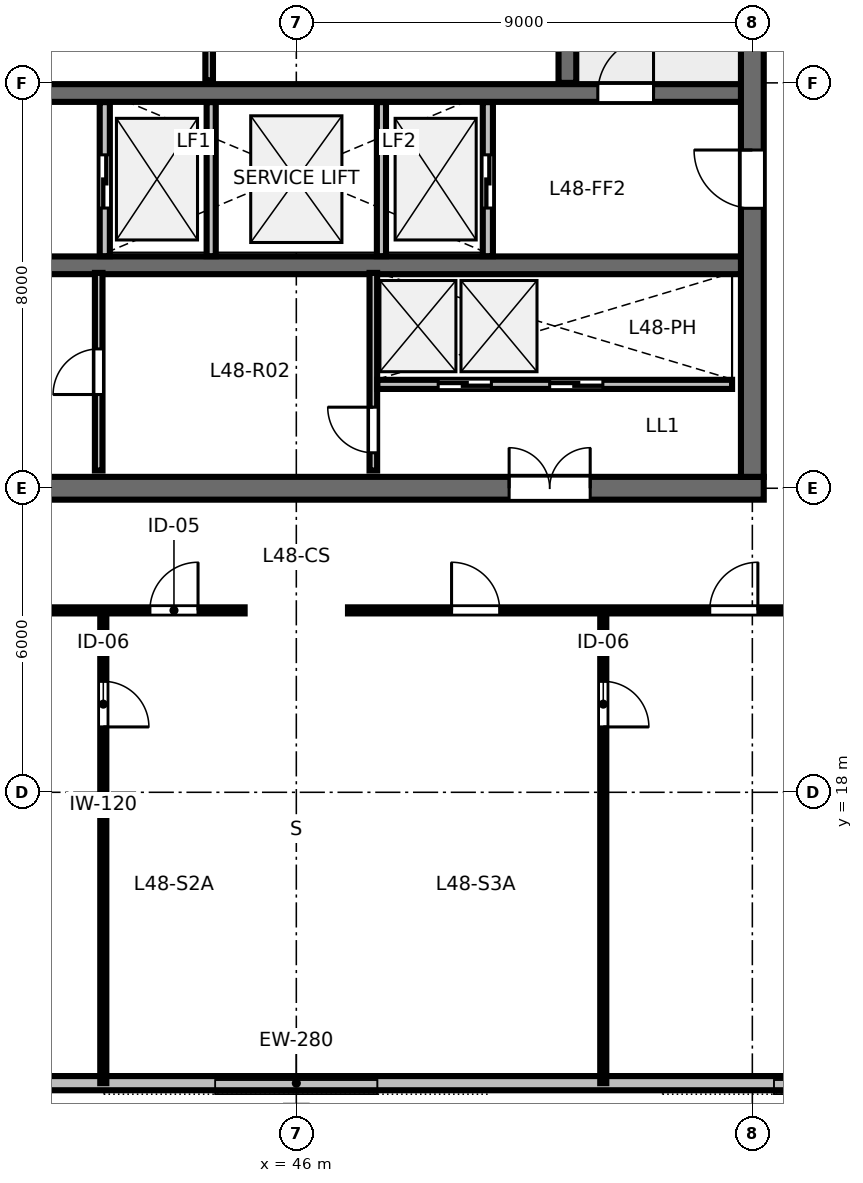
"""IFC4 building model, lengths in metres.
Left out: names, types, materials, properties, quantities, classifications, styles, units other than length and angle.
Written with IfcOpenShell. Run it as: python <this file> out.ifc"""

import sys

from ifc_helpers import new_model, si_unit, direction, frame, frame_2d, origin, origin_2d, place, context, subcontext, project, spatial, rectangle, i_section, extrude, element, fill, save


model = new_model("IFC4")
c1 = context("Model", 3, precision=1e-05, world=origin(), true_north=direction((0.0, 1.0)))
c2 = subcontext(c1, "Body", "Model", "MODEL_VIEW")
j1 = project(units=[si_unit("LENGTHUNIT", "METRE"), si_unit("PLANEANGLEUNIT", "RADIAN")], contexts=[c1])
p1 = place(None, origin())
s1 = spatial("IfcSite", under=j1, at=p1, CompositionType="ELEMENT")
p2 = place(p1, origin())
s2 = spatial("IfcBuilding", under=s1, at=p2, CompositionType="ELEMENT")
p3 = place(p2, frame((0.0, 0.0, 184.2)))
s3 = spatial("IfcBuildingStorey", under=s2, at=p3, CompositionType="ELEMENT", Elevation=184.2)
p4 = place(p3, frame((36.775, 24.0, 0.0), z_axis=(0.0, 0.0, 1.0), x_axis=(1.0, 0.0, 0.0)))
e1 = element("IfcWall", 1, at=p4, inside=s3, PredefinedType="SHEAR", context=c2, shape_type="SweptSolid", body=[
    extrude(rectangle(XDim=18.45, YDim=0.45, at=frame_2d((9.225, 0.0))), origin(), (0.0, 0.0, 1.0), 3.36),
])
p5 = place(p4, frame((13.425, 0.0, 0.0)))
e2 = element("IfcOpeningElement", 2, at=p5, cuts=e1, PredefinedType="OPENING", context=c2, shape_type="SweptSolid", body=[
    extrude(rectangle(XDim=1.6, YDim=2.15, at=frame_2d((0.8, 1.075))), frame((0.0, 0.235, 0.0), z_axis=(0.0, -1.0, 0.0), x_axis=(1.0, 0.0, 0.0)), (0.0, 0.0, 1.0), 0.47),
])
p6 = place(p3, frame((55.0, 24.225, 0.0), z_axis=(0.0, 0.0, 1.0), x_axis=(0.0, 1.0, 0.0)))
e3 = element("IfcWall", 3, at=p6, inside=s3, PredefinedType="SHEAR", context=c2, shape_type="SweptSolid", body=[
    extrude(rectangle(XDim=15.55, YDim=0.45, at=frame_2d((7.775, 0.0))), origin(), (0.0, 0.0, 1.0), 3.36),
])
p7 = place(p6, frame((5.3, 0.0, 0.0)))
e4 = element("IfcOpeningElement", 4, at=p7, cuts=e3, PredefinedType="OPENING", context=c2, shape_type="SweptSolid", body=[
    extrude(rectangle(XDim=1.15, YDim=2.15, at=frame_2d((0.575, 1.075))), frame((0.0, 0.235, 0.0), z_axis=(0.0, -1.0, 0.0), x_axis=(1.0, 0.0, 0.0)), (0.0, 0.0, 1.0), 0.47),
])
p8 = place(p3, frame((37.225, 31.8, 0.0), z_axis=(0.0, 0.0, 1.0), x_axis=(1.0, 0.0, 0.0)))
e5 = element("IfcWall", 5, at=p8, inside=s3, PredefinedType="SHEAR", context=c2, shape_type="SweptSolid", body=[
    extrude(rectangle(XDim=17.55, YDim=0.35, at=frame_2d((8.775, 0.0))), origin(), (0.0, 0.0, 1.0), 3.36),
])
p9 = place(p8, frame((0.825, 0.0, 0.0)))
e6 = element("IfcOpeningElement", 6, at=p9, cuts=e5, PredefinedType="OPENING", context=c2, shape_type="SweptSolid", body=[
    extrude(rectangle(XDim=1.1, YDim=2.15, at=frame_2d((0.55, 1.075))), frame((0.0, 0.185, 0.0), z_axis=(0.0, -1.0, 0.0), x_axis=(1.0, 0.0, 0.0)), (0.0, 0.0, 1.0), 0.37),
])
p10 = place(p8, frame((14.725, 0.0, 0.0)))
e7 = element("IfcOpeningElement", 7, at=p10, cuts=e5, PredefinedType="OPENING", context=c2, shape_type="SweptSolid", body=[
    extrude(rectangle(XDim=1.1, YDim=2.15, at=frame_2d((0.55, 1.075))), frame((0.0, 0.185, 0.0), z_axis=(0.0, -1.0, 0.0), x_axis=(1.0, 0.0, 0.0)), (0.0, 0.0, 1.0), 0.37),
])
p11 = place(p3, frame((37.225, 28.4, 0.0), z_axis=(0.0, 0.0, 1.0), x_axis=(1.0, 0.0, 0.0)))
e8 = element("IfcWall", 8, at=p11, inside=s3, PredefinedType="SHEAR", context=c2, shape_type="SweptSolid", body=[
    extrude(rectangle(XDim=17.55, YDim=0.35, at=frame_2d((8.775, 0.0))), origin(), (0.0, 0.0, 1.0), 3.36),
])
p12 = place(p3, frame((46.0, 11.6, 0.0), z_axis=(0.0, 0.192822575522, 0.981233639033), x_axis=(-1.0, 0.0, 0.0)))
e9 = element("IfcColumn", 9, at=p12, inside=s3, PredefinedType="COLUMN", context=c2, shape_type="SweptSolid", body=[
    extrude(i_section(OverallWidth=0.406, OverallDepth=0.425, WebThickness=0.033, FlangeThickness=0.052, FilletRadius=0.025, at=origin_2d()), origin(), (0.0, 0.0, 1.0), 3.422),
])
p13 = place(p3, frame((28.56, 12.26, 0.0), z_axis=(0.0, 0.0, 1.0), x_axis=(1.0, 0.0, 0.0)))
e10 = element("IfcWall", 10, at=p13, inside=s3, PredefinedType="STANDARD", context=c2, shape_type="SweptSolid", body=[
    extrude(rectangle(XDim=34.88, YDim=0.28, at=frame_2d((17.44, 0.0))), origin(), (0.0, 0.0, 1.0), 2.817),
])
p14 = place(p3, frame((51.35, 32.0, 0.0), z_axis=(0.0, 0.0, 1.0), x_axis=(0.0, 1.0, 0.0)))
e11 = element("IfcWall", 11, at=p14, inside=s3, PredefinedType="SHEAR", context=c2, shape_type="SweptSolid", body=[
    extrude(rectangle(XDim=7.7, YDim=0.35, at=frame_2d((3.85, 0.0))), origin(), (0.0, 0.0, 1.0), 3.6),
])
p15 = place(p3, frame((44.28, 32.05, 0.0), z_axis=(0.0, 0.0, 1.0), x_axis=(0.0, 1.0, 0.0)))
e12 = element("IfcWall", 12, at=p15, inside=s3, PredefinedType="PARTITIONING", context=c2, shape_type="SweptSolid", body=[
    extrude(rectangle(XDim=3.67, YDim=0.15, at=frame_2d((1.835, 0.0))), origin(), (0.0, 0.0, 1.0), 3.36),
])
p16 = place(p15, frame((1.35, 0.0, 0.0)))
e13 = element("IfcOpeningElement", 13, at=p16, cuts=e12, PredefinedType="OPENING", context=c2, shape_type="SweptSolid", body=[
    extrude(rectangle(XDim=0.92, YDim=2.15, at=frame_2d((0.46, 1.075))), frame((0.0, 0.085, 0.0), z_axis=(0.0, -1.0, 0.0), x_axis=(1.0, 0.0, 0.0)), (0.0, 0.0, 1.0), 0.17),
])
p17 = place(p3, frame((42.22, 28.58, 0.0), z_axis=(0.0, 0.0, 1.0), x_axis=(0.0, 1.0, 0.0)))
e14 = element("IfcWall", 14, at=p17, inside=s3, PredefinedType="PARTITIONING", context=c2, shape_type="SweptSolid", body=[
    extrude(rectangle(XDim=3.04, YDim=0.2, at=frame_2d((1.52, 0.0))), origin(), (0.0, 0.0, 1.0), 3.36),
])
p18 = place(p17, frame((0.95, 0.0, 0.0)))
e15 = element("IfcOpeningElement", 15, at=p18, cuts=e14, PredefinedType="OPENING", context=c2, shape_type="SweptSolid", body=[
    extrude(rectangle(XDim=1.05, YDim=2.15, at=frame_2d((0.525, 1.075))), frame((0.0, 0.11, 0.0), z_axis=(0.0, -1.0, 0.0), x_axis=(1.0, 0.0, 0.0)), (0.0, 0.0, 1.0), 0.22),
])
p19 = place(p3, frame((49.78, 28.58, 0.0), z_axis=(0.0, 0.0, 1.0), x_axis=(0.0, 1.0, 0.0)))
e16 = element("IfcWall", 16, at=p19, inside=s3, PredefinedType="PARTITIONING", context=c2, shape_type="SweptSolid", body=[
    extrude(rectangle(XDim=3.04, YDim=0.2, at=frame_2d((1.52, 0.0))), origin(), (0.0, 0.0, 1.0), 3.36),
])
p20 = place(p19, frame((0.95, 0.0, 0.0)))
e17 = element("IfcOpeningElement", 17, at=p20, cuts=e16, PredefinedType="OPENING", context=c2, shape_type="SweptSolid", body=[
    extrude(rectangle(XDim=1.05, YDim=2.15, at=frame_2d((0.525, 1.075))), frame((0.0, 0.11, 0.0), z_axis=(0.0, -1.0, 0.0), x_axis=(1.0, 0.0, 0.0)), (0.0, 0.0, 1.0), 0.22),
])
for number, where, z_axis, x_axis in (
    (18, (44.32, 28.58, 0.0), (0.0, 0.0, 1.0), (0.0, 1.0, 0.0)),
    (19, (47.68, 28.58, 0.0), (0.0, 0.0, 1.0), (0.0, 1.0, 0.0)),
):
    element("IfcWall", number, at=place(p3, frame(where, z_axis=z_axis, x_axis=x_axis)), inside=s3, PredefinedType="PARTITIONING", context=c2, shape_type="SweptSolid", body=[
        extrude(rectangle(XDim=3.04, YDim=0.18, at=frame_2d((1.52, 0.0))), origin(), (0.0, 0.0, 1.0), 3.36),
    ])
p21 = place(p3, frame((42.1, 24.35, 0.0), z_axis=(0.0, 0.0, 1.0), x_axis=(0.0, 1.0, 0.0)))
e20 = element("IfcWall", 20, at=p21, inside=s3, PredefinedType="PARTITIONING", context=c2, shape_type="SweptSolid", body=[
    extrude(rectangle(XDim=3.9, YDim=0.15, at=frame_2d((1.95, 0.0))), origin(), (0.0, 0.0, 1.0), 3.36),
])
p22 = place(p21, frame((1.5, 0.0, 0.0)))
e21 = element("IfcOpeningElement", 21, at=p22, cuts=e20, PredefinedType="OPENING", context=c2, shape_type="SweptSolid", body=[
    extrude(rectangle(XDim=0.9, YDim=2.15, at=frame_2d((0.45, 1.075))), frame((0.0, 0.085, 0.0), z_axis=(0.0, -1.0, 0.0), x_axis=(1.0, 0.0, 0.0)), (0.0, 0.0, 1.0), 0.17),
])
p23 = place(p3, frame((47.52, 24.35, 0.0), z_axis=(0.0, 0.0, 1.0), x_axis=(0.0, 1.0, 0.0)))
e22 = element("IfcWall", 22, at=p23, inside=s3, PredefinedType="PARTITIONING", context=c2, shape_type="SweptSolid", body=[
    extrude(rectangle(XDim=3.9, YDim=0.15, at=frame_2d((1.95, 0.0))), origin(), (0.0, 0.0, 1.0), 3.36),
])
p24 = place(p23, frame((0.35, 0.0, 0.0)))
e23 = element("IfcOpeningElement", 23, at=p24, cuts=e22, PredefinedType="OPENING", context=c2, shape_type="SweptSolid", body=[
    extrude(rectangle(XDim=0.9, YDim=2.15, at=frame_2d((0.45, 1.075))), frame((0.0, 0.085, 0.0), z_axis=(0.0, -1.0, 0.0), x_axis=(1.0, 0.0, 0.0)), (0.0, 0.0, 1.0), 0.17),
])
p25 = place(p3, frame((47.6, 26.05, 0.0), z_axis=(0.0, 0.0, 1.0), x_axis=(1.0, 0.0, 0.0)))
e24 = element("IfcWall", 24, at=p25, inside=s3, PredefinedType="PARTITIONING", context=c2, shape_type="SweptSolid", body=[
    extrude(rectangle(XDim=7.0, YDim=0.18, at=frame_2d((3.5, 0.0))), origin(), (0.0, 0.0, 1.0), 3.36),
])
p26 = place(p25, frame((1.2, 0.0, 0.0)))
e25 = element("IfcOpeningElement", 25, at=p26, cuts=e24, PredefinedType="OPENING", context=c2, shape_type="SweptSolid", body=[
    extrude(rectangle(XDim=1.05, YDim=2.15, at=frame_2d((0.525, 1.075))), frame((0.0, 0.1, 0.0), z_axis=(0.0, -1.0, 0.0), x_axis=(1.0, 0.0, 0.0)), (0.0, 0.0, 1.0), 0.2),
])
p27 = place(p25, frame((3.4, 0.0, 0.0)))
e26 = element("IfcOpeningElement", 26, at=p27, cuts=e24, PredefinedType="OPENING", context=c2, shape_type="SweptSolid", body=[
    extrude(rectangle(XDim=1.05, YDim=2.15, at=frame_2d((0.525, 1.075))), frame((0.0, 0.1, 0.0), z_axis=(0.0, -1.0, 0.0), x_axis=(1.0, 0.0, 0.0)), (0.0, 0.0, 1.0), 0.2),
])
p28 = place(p3, frame((42.191, 21.59, 0.0), z_axis=(0.0, 0.0, 1.0), x_axis=(0.0, -1.0, 0.0)))
e27 = element("IfcWall", 27, at=p28, inside=s3, PredefinedType="PARTITIONING", context=c2, shape_type="SweptSolid", body=[
    extrude(rectangle(XDim=9.33, YDim=0.12, at=frame_2d((4.665, 0.0))), origin(), (0.0, 0.0, 1.0), 2.64),
])
p29 = place(p28, frame((1.4, 0.0, 0.0)))
e28 = element("IfcOpeningElement", 28, at=p29, cuts=e27, PredefinedType="OPENING", context=c2, shape_type="SweptSolid", body=[
    extrude(rectangle(XDim=0.9, YDim=2.15, at=frame_2d((0.45, 1.075))), frame((0.0, 0.07, 0.0), z_axis=(0.0, -1.0, 0.0), x_axis=(1.0, 0.0, 0.0)), (0.0, 0.0, 1.0), 0.14),
])
p30 = place(p3, frame((52.058, 21.59, 0.0), z_axis=(0.0, 0.0, 1.0), x_axis=(0.0, -1.0, 0.0)))
e29 = element("IfcWall", 29, at=p30, inside=s3, PredefinedType="PARTITIONING", context=c2, shape_type="SweptSolid", body=[
    extrude(rectangle(XDim=9.33, YDim=0.12, at=frame_2d((4.665, 0.0))), origin(), (0.0, 0.0, 1.0), 2.64),
])
p31 = place(p30, frame((1.4, 0.0, 0.0)))
e30 = element("IfcOpeningElement", 30, at=p31, cuts=e29, PredefinedType="OPENING", context=c2, shape_type="SweptSolid", body=[
    extrude(rectangle(XDim=0.9, YDim=2.15, at=frame_2d((0.45, 1.075))), frame((0.0, 0.07, 0.0), z_axis=(0.0, -1.0, 0.0), x_axis=(1.0, 0.0, 0.0)), (0.0, 0.0, 1.0), 0.14),
])
p32 = place(p3, frame((34.65, 21.59, 0.0), z_axis=(0.0, 0.0, 1.0), x_axis=(1.0, 0.0, 0.0)))
e31 = element("IfcWall", 31, at=p32, inside=s3, PredefinedType="PARTITIONING", context=c2, shape_type="SweptSolid", body=[
    extrude(rectangle(XDim=10.33, YDim=0.12, at=frame_2d((5.165, 0.0))), origin(), (0.0, 0.0, 1.0), 2.64),
])
p33 = place(p32, frame((3.365, 0.0, 0.0)))
e32 = element("IfcOpeningElement", 32, at=p33, cuts=e31, PredefinedType="OPENING", context=c2, shape_type="SweptSolid", body=[
    extrude(rectangle(XDim=0.95, YDim=2.15, at=frame_2d((0.475, 1.075))), frame((0.0, 0.07, 0.0), z_axis=(0.0, -1.0, 0.0), x_axis=(1.0, 0.0, 0.0)), (0.0, 0.0, 1.0), 0.14),
])
p34 = place(p32, frame((8.46, 0.0, 0.0)))
e33 = element("IfcOpeningElement", 33, at=p34, cuts=e31, PredefinedType="OPENING", context=c2, shape_type="SweptSolid", body=[
    extrude(rectangle(XDim=0.95, YDim=2.15, at=frame_2d((0.475, 1.075))), frame((0.0, 0.07, 0.0), z_axis=(0.0, -1.0, 0.0), x_axis=(1.0, 0.0, 0.0)), (0.0, 0.0, 1.0), 0.14),
])
p35 = place(p3, frame((47.02, 21.59, 0.0), z_axis=(0.0, 0.0, 1.0), x_axis=(1.0, 0.0, 0.0)))
e34 = element("IfcWall", 34, at=p35, inside=s3, PredefinedType="PARTITIONING", context=c2, shape_type="SweptSolid", body=[
    extrude(rectangle(XDim=10.33, YDim=0.12, at=frame_2d((5.165, 0.0))), origin(), (0.0, 0.0, 1.0), 2.64),
])
p36 = place(p35, frame((2.044, 0.0, 0.0)))
e35 = element("IfcOpeningElement", 35, at=p36, cuts=e34, PredefinedType="OPENING", context=c2, shape_type="SweptSolid", body=[
    extrude(rectangle(XDim=0.95, YDim=2.15, at=frame_2d((0.475, 1.075))), frame((0.0, 0.07, 0.0), z_axis=(0.0, -1.0, 0.0), x_axis=(1.0, 0.0, 0.0)), (0.0, 0.0, 1.0), 0.14),
])
p37 = place(p35, frame((7.139, 0.0, 0.0)))
e36 = element("IfcOpeningElement", 36, at=p37, cuts=e34, PredefinedType="OPENING", context=c2, shape_type="SweptSolid", body=[
    extrude(rectangle(XDim=0.95, YDim=2.15, at=frame_2d((0.475, 1.075))), frame((0.0, 0.07, 0.0), z_axis=(0.0, -1.0, 0.0), x_axis=(1.0, 0.0, 0.0)), (0.0, 0.0, 1.0), 0.14),
])
p38 = place(p10, origin())
e37 = element("IfcDoor", 37, at=p38, inside=s3, OperationType="SINGLE_SWING_RIGHT", PredefinedType="DOOR", context=c2, shape_type="SweptSolid", body=[
    extrude(rectangle(XDim=1.1, YDim=2.15, at=frame_2d((0.55, 1.075))), frame((0.0, 0.025, 0.0), z_axis=(0.0, -1.0, 0.0), x_axis=(1.0, 0.0, 0.0)), (0.0, 0.0, 1.0), 0.05),
])
fill(e7, e37)
p39 = place(p7, origin())
e38 = element("IfcDoor", 38, at=p39, inside=s3, OperationType="SINGLE_SWING_RIGHT", PredefinedType="DOOR", context=c2, shape_type="SweptSolid", body=[
    extrude(rectangle(XDim=1.15, YDim=2.15, at=frame_2d((0.575, 1.075))), frame((0.0, 0.025, 0.0), z_axis=(0.0, -1.0, 0.0), x_axis=(1.0, 0.0, 0.0)), (0.0, 0.0, 1.0), 0.05),
])
fill(e4, e38)
p40 = place(p5, origin())
e39 = element("IfcDoor", 39, at=p40, inside=s3, OperationType="DOUBLE_DOOR_SINGLE_SWING", PredefinedType="DOOR", context=c2, shape_type="SweptSolid", body=[
    extrude(rectangle(XDim=1.6, YDim=2.15, at=frame_2d((0.8, 1.075))), frame((0.0, 0.025, 0.0), z_axis=(0.0, -1.0, 0.0), x_axis=(1.0, 0.0, 0.0)), (0.0, 0.0, 1.0), 0.05),
])
fill(e2, e39)
p41 = place(p18, origin())
e40 = element("IfcDoor", 40, at=p41, inside=s3, OperationType="SLIDING_TO_LEFT", PredefinedType="DOOR", context=c2, shape_type="SweptSolid", body=[
    extrude(rectangle(XDim=1.05, YDim=2.15, at=frame_2d((0.525, 1.075))), frame((0.0, 0.025, 0.0), z_axis=(0.0, -1.0, 0.0), x_axis=(1.0, 0.0, 0.0)), (0.0, 0.0, 1.0), 0.05),
])
fill(e15, e40)
p42 = place(p20, origin())
e41 = element("IfcDoor", 41, at=p42, inside=s3, OperationType="SLIDING_TO_RIGHT", PredefinedType="DOOR", context=c2, shape_type="SweptSolid", body=[
    extrude(rectangle(XDim=1.05, YDim=2.15, at=frame_2d((0.525, 1.075))), frame((0.0, 0.025, 0.0), z_axis=(0.0, -1.0, 0.0), x_axis=(1.0, 0.0, 0.0)), (0.0, 0.0, 1.0), 0.05),
])
fill(e17, e41)
p43 = place(p22, origin())
e42 = element("IfcDoor", 42, at=p43, inside=s3, OperationType="SINGLE_SWING_LEFT", PredefinedType="DOOR", context=c2, shape_type="SweptSolid", body=[
    extrude(rectangle(XDim=0.9, YDim=2.15, at=frame_2d((0.45, 1.075))), frame((0.0, 0.025, 0.0), z_axis=(0.0, -1.0, 0.0), x_axis=(1.0, 0.0, 0.0)), (0.0, 0.0, 1.0), 0.05),
])
fill(e21, e42)
p44 = place(p24, origin())
e43 = element("IfcDoor", 43, at=p44, inside=s3, OperationType="SINGLE_SWING_RIGHT", PredefinedType="DOOR", context=c2, shape_type="SweptSolid", body=[
    extrude(rectangle(XDim=0.9, YDim=2.15, at=frame_2d((0.45, 1.075))), frame((0.0, 0.025, 0.0), z_axis=(0.0, -1.0, 0.0), x_axis=(1.0, 0.0, 0.0)), (0.0, 0.0, 1.0), 0.05),
])
fill(e23, e43)
p45 = place(p26, origin())
e44 = element("IfcDoor", 44, at=p45, inside=s3, OperationType="SLIDING_TO_LEFT", PredefinedType="DOOR", context=c2, shape_type="SweptSolid", body=[
    extrude(rectangle(XDim=1.05, YDim=2.15, at=frame_2d((0.525, 1.075))), frame((0.0, 0.025, 0.0), z_axis=(0.0, -1.0, 0.0), x_axis=(1.0, 0.0, 0.0)), (0.0, 0.0, 1.0), 0.05),
])
fill(e25, e44)
p46 = place(p27, origin())
e45 = element("IfcDoor", 45, at=p46, inside=s3, OperationType="SLIDING_TO_RIGHT", PredefinedType="DOOR", context=c2, shape_type="SweptSolid", body=[
    extrude(rectangle(XDim=1.05, YDim=2.15, at=frame_2d((0.525, 1.075))), frame((0.0, 0.025, 0.0), z_axis=(0.0, -1.0, 0.0), x_axis=(1.0, 0.0, 0.0)), (0.0, 0.0, 1.0), 0.05),
])
fill(e26, e45)
p47 = place(p29, origin())
e46 = element("IfcDoor", 46, at=p47, inside=s3, OperationType="SINGLE_SWING_RIGHT", PredefinedType="DOOR", context=c2, shape_type="SweptSolid", body=[
    extrude(rectangle(XDim=0.9, YDim=2.15, at=frame_2d((0.45, 1.075))), frame((0.0, 0.025, 0.0), z_axis=(0.0, -1.0, 0.0), x_axis=(1.0, 0.0, 0.0)), (0.0, 0.0, 1.0), 0.05),
])
fill(e28, e46)
p48 = place(p31, origin())
e47 = element("IfcDoor", 47, at=p48, inside=s3, OperationType="SINGLE_SWING_RIGHT", PredefinedType="DOOR", context=c2, shape_type="SweptSolid", body=[
    extrude(rectangle(XDim=0.9, YDim=2.15, at=frame_2d((0.45, 1.075))), frame((0.0, 0.025, 0.0), z_axis=(0.0, -1.0, 0.0), x_axis=(1.0, 0.0, 0.0)), (0.0, 0.0, 1.0), 0.05),
])
fill(e30, e47)
p49 = place(p34, origin())
e48 = element("IfcDoor", 48, at=p49, inside=s3, OperationType="SINGLE_SWING_RIGHT", PredefinedType="DOOR", context=c2, shape_type="SweptSolid", body=[
    extrude(rectangle(XDim=0.95, YDim=2.15, at=frame_2d((0.475, 1.075))), frame((0.0, 0.025, 0.0), z_axis=(0.0, -1.0, 0.0), x_axis=(1.0, 0.0, 0.0)), (0.0, 0.0, 1.0), 0.05),
])
fill(e33, e48)
p50 = place(p36, origin())
e49 = element("IfcDoor", 49, at=p50, inside=s3, OperationType="SINGLE_SWING_LEFT", PredefinedType="DOOR", context=c2, shape_type="SweptSolid", body=[
    extrude(rectangle(XDim=0.95, YDim=2.15, at=frame_2d((0.475, 1.075))), frame((0.0, 0.025, 0.0), z_axis=(0.0, -1.0, 0.0), x_axis=(1.0, 0.0, 0.0)), (0.0, 0.0, 1.0), 0.05),
])
fill(e35, e49)
p51 = place(p37, origin())
e50 = element("IfcDoor", 50, at=p51, inside=s3, OperationType="SINGLE_SWING_RIGHT", PredefinedType="DOOR", context=c2, shape_type="SweptSolid", body=[
    extrude(rectangle(XDim=0.95, YDim=2.15, at=frame_2d((0.475, 1.075))), frame((0.0, 0.025, 0.0), z_axis=(0.0, -1.0, 0.0), x_axis=(1.0, 0.0, 0.0)), (0.0, 0.0, 1.0), 0.05),
])
fill(e36, e50)
save(model, sys.argv[1])
